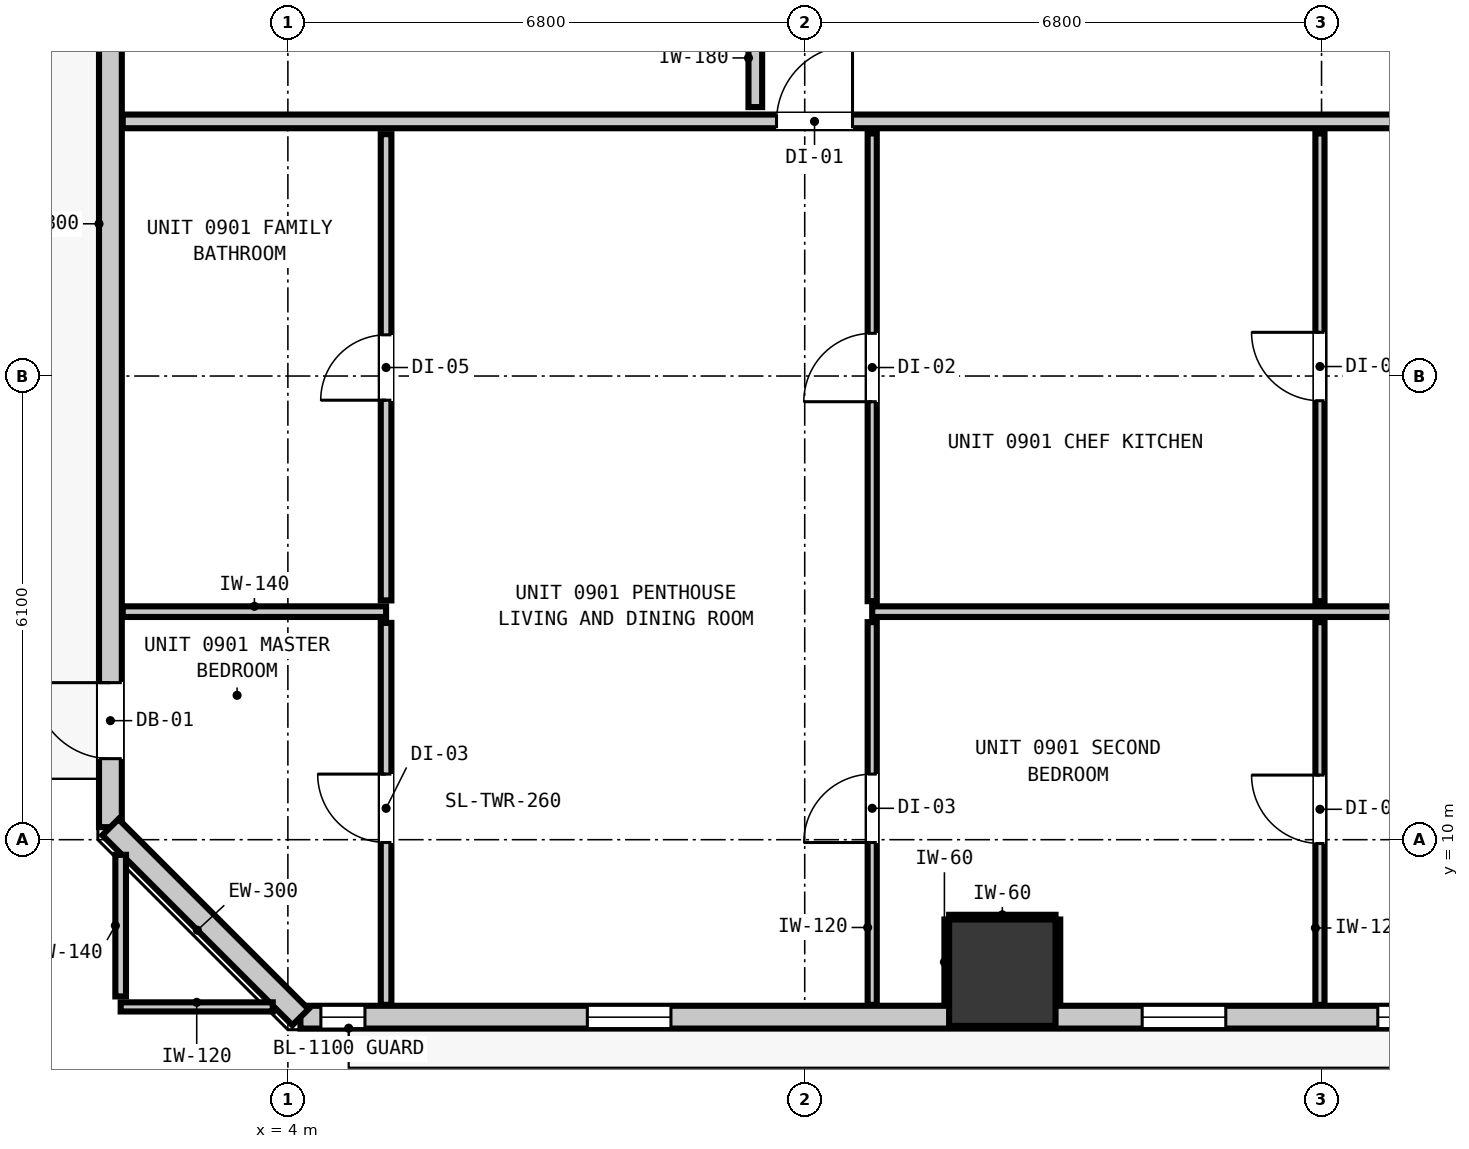
"""IFC4 building model, lengths in metres.
Left out: names, types, materials, properties, quantities, classifications, styles, units other than length and angle.
Written with IfcOpenShell. Run it as: python <this file> out.ifc"""

import sys

from ifc_helpers import new_model, si_unit, direction, frame, frame_2d, origin, origin_2d, place, context, subcontext, project, spatial, rectangle, extrude, element, fill, save


model = new_model("IFC4")
c1 = context("Model", 3, precision=1e-05, world=origin(), true_north=direction((0.0, 1.0)))
c2 = subcontext(c1, "Body", "Model", "MODEL_VIEW")
j1 = project(units=[si_unit("LENGTHUNIT", "METRE"), si_unit("PLANEANGLEUNIT", "RADIAN")], contexts=[c1])
p1 = place(None, origin())
s1 = spatial("IfcSite", under=j1, at=p1, CompositionType="ELEMENT")
p2 = place(p1, origin())
s2 = spatial("IfcBuilding", under=s1, at=p2, CompositionType="ELEMENT")
p3 = place(p2, frame((0.0, 0.0, 35.28)))
s3 = spatial("IfcBuildingStorey", under=s2, at=p3, CompositionType="ELEMENT", Elevation=35.28)
p4 = place(p3, frame((13.4, 8.25, 0.0), z_axis=(0.0, 0.0, 1.0), x_axis=(1.0, 0.0, 0.0)))
e1 = element("IfcColumn", 1, at=p4, inside=s3, PredefinedType="COLUMN", context=c2, shape_type="SweptSolid", body=[
    extrude(rectangle(XDim=1.4, YDim=1.4, at=origin_2d()), origin(), (0.0, 0.0, 1.0), 3.32),
])
p5 = place(p3, frame((1.665, 10.165, 0.0), z_axis=(0.0, 0.0, 1.0), x_axis=(0.0, 1.0, 0.0)))
e2 = element("IfcWall", 2, at=p5, inside=s3, PredefinedType="STANDARD", context=c2, shape_type="SweptSolid", body=[
    extrude(rectangle(XDim=34.67, YDim=0.3, at=frame_2d((17.335, 0.0))), origin(), (0.0, 0.0, 1.0), 3.06),
])
p6 = place(p5, frame((0.901, 0.0, 0.0)))
e3 = element("IfcOpeningElement", 3, at=p6, cuts=e2, PredefinedType="OPENING", context=c2, shape_type="SweptSolid", body=[
    extrude(rectangle(XDim=1.0, YDim=2.15, at=frame_2d((0.5, 1.075))), frame((0.0, 0.16, 0.0), z_axis=(0.0, -1.0, 0.0), x_axis=(1.0, 0.0, 0.0)), (0.0, 0.0, 1.0), 0.32),
])
p7 = place(p5, frame((17.825, 0.0, 0.85)))
e4 = element("IfcOpeningElement", 4, at=p7, cuts=e2, PredefinedType="OPENING", context=c2, shape_type="SweptSolid", body=[
    extrude(rectangle(XDim=1.1, YDim=2.05, at=frame_2d((0.55, 1.025))), frame((0.0, 0.16, 0.0), z_axis=(0.0, -1.0, 0.0), x_axis=(1.0, 0.0, 0.0)), (0.0, 0.0, 1.0), 0.32),
])
p8 = place(p5, frame((13.975, 0.0, 0.85)))
e5 = element("IfcOpeningElement", 5, at=p8, cuts=e2, PredefinedType="OPENING", context=c2, shape_type="SweptSolid", body=[
    extrude(rectangle(XDim=1.1, YDim=2.05, at=frame_2d((0.55, 1.025))), frame((0.0, 0.16, 0.0), z_axis=(0.0, -1.0, 0.0), x_axis=(1.0, 0.0, 0.0)), (0.0, 0.0, 1.0), 0.32),
])
p9 = place(p5, frame((25.995, 0.0, 0.85)))
e6 = element("IfcOpeningElement", 6, at=p9, cuts=e2, PredefinedType="OPENING", context=c2, shape_type="SweptSolid", body=[
    extrude(rectangle(XDim=1.1, YDim=2.05, at=frame_2d((0.55, 1.025))), frame((0.0, 0.16, 0.0), z_axis=(0.0, -1.0, 0.0), x_axis=(1.0, 0.0, 0.0)), (0.0, 0.0, 1.0), 0.32),
])
p10 = place(p3, frame((41.635, 7.665, 0.0), z_axis=(0.0, 0.0, 1.0), x_axis=(-1.0, 0.0, 0.0)))
e7 = element("IfcWall", 7, at=p10, inside=s3, PredefinedType="STANDARD", context=c2, shape_type="SweptSolid", body=[
    extrude(rectangle(XDim=37.47, YDim=0.3, at=frame_2d((18.735, 0.0))), origin(), (0.0, 0.0, 1.0), 3.06),
])
p11 = place(p10, frame((0.901, 0.0, 0.0)))
e8 = element("IfcOpeningElement", 8, at=p11, cuts=e7, PredefinedType="OPENING", context=c2, shape_type="SweptSolid", body=[
    extrude(rectangle(XDim=1.0, YDim=2.15, at=frame_2d((0.5, 1.075))), frame((0.0, 0.16, 0.0), z_axis=(0.0, -1.0, 0.0), x_axis=(1.0, 0.0, 0.0)), (0.0, 0.0, 1.0), 0.32),
])
p12 = place(p10, frame((32.595, 0.0, 0.85)))
e9 = element("IfcOpeningElement", 9, at=p12, cuts=e7, PredefinedType="OPENING", context=c2, shape_type="SweptSolid", body=[
    extrude(rectangle(XDim=1.1, YDim=2.05, at=frame_2d((0.55, 1.025))), frame((0.0, 0.16, 0.0), z_axis=(0.0, -1.0, 0.0), x_axis=(1.0, 0.0, 0.0)), (0.0, 0.0, 1.0), 0.32),
])
p13 = place(p10, frame((36.621, 0.0, 0.85)))
e10 = element("IfcOpeningElement", 10, at=p13, cuts=e7, PredefinedType="OPENING", context=c2, shape_type="SweptSolid", body=[
    extrude(rectangle(XDim=0.58, YDim=1.5, at=frame_2d((0.29, 0.75))), frame((0.0, 0.16, 0.0), z_axis=(0.0, -1.0, 0.0), x_axis=(1.0, 0.0, 0.0)), (0.0, 0.0, 1.0), 0.32),
])
p14 = place(p10, frame((25.295, 0.0, 0.85)))
e11 = element("IfcOpeningElement", 11, at=p14, cuts=e7, PredefinedType="OPENING", context=c2, shape_type="SweptSolid", body=[
    extrude(rectangle(XDim=1.1, YDim=2.05, at=frame_2d((0.55, 1.025))), frame((0.0, 0.16, 0.0), z_axis=(0.0, -1.0, 0.0), x_axis=(1.0, 0.0, 0.0)), (0.0, 0.0, 1.0), 0.32),
])
p15 = place(p10, frame((22.195, 0.0, 0.85)))
e12 = element("IfcOpeningElement", 12, at=p15, cuts=e7, PredefinedType="OPENING", context=c2, shape_type="SweptSolid", body=[
    extrude(rectangle(XDim=1.1, YDim=2.05, at=frame_2d((0.55, 1.025))), frame((0.0, 0.16, 0.0), z_axis=(0.0, -1.0, 0.0), x_axis=(1.0, 0.0, 0.0)), (0.0, 0.0, 1.0), 0.32),
])
p16 = place(p10, frame((8.235, 0.0, 0.85)))
e13 = element("IfcOpeningElement", 13, at=p16, cuts=e7, PredefinedType="OPENING", context=c2, shape_type="SweptSolid", body=[
    extrude(rectangle(XDim=1.1, YDim=2.05, at=frame_2d((0.55, 1.025))), frame((0.0, 0.16, 0.0), z_axis=(0.0, -1.0, 0.0), x_axis=(1.0, 0.0, 0.0)), (0.0, 0.0, 1.0), 0.32),
])
p17 = place(p10, frame((16.219, 0.0, 0.85)))
e14 = element("IfcOpeningElement", 14, at=p17, cuts=e7, PredefinedType="OPENING", context=c2, shape_type="SweptSolid", body=[
    extrude(rectangle(XDim=1.1, YDim=2.05, at=frame_2d((0.55, 1.025))), frame((0.0, 0.16, 0.0), z_axis=(0.0, -1.0, 0.0), x_axis=(1.0, 0.0, 0.0)), (0.0, 0.0, 1.0), 0.32),
])
p18 = place(p3, frame((4.165, 7.665, 0.0), z_axis=(0.0, 0.0, 1.0), x_axis=(-0.707106781187, 0.707106781187, 0.0)))
e15 = element("IfcWall", 15, at=p18, inside=s3, PredefinedType="STANDARD", context=c2, shape_type="SweptSolid", body=[
    extrude(rectangle(XDim=3.536, YDim=0.3, at=frame_2d((1.768, 0.0))), origin(), (0.0, 0.0, 1.0), 3.06),
])
p19 = place(p3, frame((1.827, 19.45, 0.0), z_axis=(0.0, 0.0, 1.0), x_axis=(1.0, 0.0, 0.0)))
e16 = element("IfcWall", 16, at=p19, inside=s3, PredefinedType="PARTITIONING", context=c2, shape_type="SweptSolid", body=[
    extrude(rectangle(XDim=42.146, YDim=0.18, at=frame_2d((21.073, 0.0))), origin(), (0.0, 0.0, 1.0), 3.06),
])
p20 = place(p19, frame((8.602, 0.0, 0.0)))
e17 = element("IfcOpeningElement", 17, at=p20, cuts=e16, PredefinedType="OPENING", context=c2, shape_type="SweptSolid", body=[
    extrude(rectangle(XDim=1.0, YDim=2.15, at=frame_2d((0.5, 1.075))), frame((0.0, 0.1, 0.0), z_axis=(0.0, -1.0, 0.0), x_axis=(1.0, 0.0, 0.0)), (0.0, 0.0, 1.0), 0.2),
])
p21 = place(p19, frame((30.475, 0.0, 0.0)))
e18 = element("IfcOpeningElement", 18, at=p21, cuts=e16, PredefinedType="OPENING", context=c2, shape_type="SweptSolid", body=[
    extrude(rectangle(XDim=1.0, YDim=2.15, at=frame_2d((0.5, 1.075))), frame((0.0, 0.1, 0.0), z_axis=(0.0, -1.0, 0.0), x_axis=(1.0, 0.0, 0.0)), (0.0, 0.0, 1.0), 0.2),
])
p22 = place(p3, frame((1.827, 13.0, 0.0), z_axis=(0.0, 0.0, 1.0), x_axis=(1.0, 0.0, 0.0)))
e19 = element("IfcWall", 19, at=p22, inside=s3, PredefinedType="PARTITIONING", context=c2, shape_type="SweptSolid", body=[
    extrude(rectangle(XDim=3.465, YDim=0.14, at=frame_2d((1.732, 0.0))), origin(), (0.0, 0.0, 1.0), 3.06),
])
p23 = place(p3, frame((11.688, 13.0, 0.0), z_axis=(0.0, 0.0, 1.0), x_axis=(1.0, 0.0, 0.0)))
e20 = element("IfcWall", 20, at=p23, inside=s3, PredefinedType="PARTITIONING", context=c2, shape_type="SweptSolid", body=[
    extrude(rectangle(XDim=32.285, YDim=0.14, at=frame_2d((16.143, 0.0))), origin(), (0.0, 0.0, 1.0), 3.06),
])
p24 = place(p23, frame((20.664, 0.0, 0.0)))
e21 = element("IfcOpeningElement", 21, at=p24, cuts=e20, PredefinedType="OPENING", context=c2, shape_type="SweptSolid", body=[
    extrude(rectangle(XDim=0.9, YDim=2.1, at=frame_2d((0.45, 1.05))), frame((0.0, 0.08, 0.0), z_axis=(0.0, -1.0, 0.0), x_axis=(1.0, 0.0, 0.0)), (0.0, 0.0, 1.0), 0.16),
])
p25 = place(p3, frame((1.8, 7.8, 0.0), z_axis=(0.0, 0.0, 1.0), x_axis=(1.0, 0.0, 0.0)))
e22 = element("IfcWall", 22, at=p25, inside=s3, PredefinedType="PARTITIONING", context=c2, shape_type="SweptSolid", body=[
    extrude(rectangle(XDim=2.001, YDim=0.12, at=frame_2d((1.0, 0.0))), origin(), (0.0, 0.0, 1.0), 3.06),
])
p26 = place(p3, frame((10.15, 19.638, 0.0), z_axis=(0.0, 0.0, 1.0), x_axis=(0.0, 1.0, 0.0)))
e23 = element("IfcWall", 23, at=p26, inside=s3, PredefinedType="PARTITIONING", context=c2, shape_type="SweptSolid", body=[
    extrude(rectangle(XDim=1.294, YDim=0.18, at=frame_2d((0.647, 0.0))), origin(), (0.0, 0.0, 1.0), 3.06),
])
p27 = place(p3, frame((1.8, 7.938, 0.0), z_axis=(0.0, 0.0, 1.0), x_axis=(0.0, 1.0, 0.0)))
e24 = element("IfcWall", 24, at=p27, inside=s3, PredefinedType="PARTITIONING", context=c2, shape_type="SweptSolid", body=[
    extrude(rectangle(XDim=1.863, YDim=0.14, at=frame_2d((0.932, 0.0))), origin(), (0.0, 0.0, 1.0), 3.06),
])
p28 = place(p3, frame((5.292, 7.827, 0.0), z_axis=(0.0, 0.0, 1.0), x_axis=(0.0, 1.0, 0.0)))
e25 = element("IfcWall", 25, at=p28, inside=s3, PredefinedType="PARTITIONING", context=c2, shape_type="SweptSolid", body=[
    extrude(rectangle(XDim=5.025, YDim=0.14, at=frame_2d((2.513, 0.0))), origin(), (0.0, 0.0, 1.0), 3.06),
])
p29 = place(p28, frame((2.136, 0.0, 0.0)))
e26 = element("IfcOpeningElement", 26, at=p29, cuts=e25, PredefinedType="OPENING", context=c2, shape_type="SweptSolid", body=[
    extrude(rectangle(XDim=0.9, YDim=2.1, at=frame_2d((0.45, 1.05))), frame((0.0, 0.08, 0.0), z_axis=(0.0, -1.0, 0.0), x_axis=(1.0, 0.0, 0.0)), (0.0, 0.0, 1.0), 0.16),
])
p30 = place(p3, frame((5.292, 13.148, 0.0), z_axis=(0.0, 0.0, 1.0), x_axis=(0.0, 1.0, 0.0)))
e27 = element("IfcWall", 27, at=p30, inside=s3, PredefinedType="PARTITIONING", context=c2, shape_type="SweptSolid", body=[
    extrude(rectangle(XDim=6.134, YDim=0.14, at=frame_2d((3.067, 0.0))), origin(), (0.0, 0.0, 1.0), 3.06),
])
p31 = place(p30, frame((2.634, 0.0, 0.0)))
e28 = element("IfcOpeningElement", 28, at=p31, cuts=e27, PredefinedType="OPENING", context=c2, shape_type="SweptSolid", body=[
    extrude(rectangle(XDim=0.86, YDim=2.02, at=frame_2d((0.43, 1.01))), frame((0.0, 0.08, 0.0), z_axis=(0.0, -1.0, 0.0), x_axis=(1.0, 0.0, 0.0)), (0.0, 0.0, 1.0), 0.16),
])
p32 = place(p3, frame((11.688, 7.827, 0.0), z_axis=(0.0, 0.0, 1.0), x_axis=(0.0, 1.0, 0.0)))
e29 = element("IfcWall", 29, at=p32, inside=s3, PredefinedType="PARTITIONING", context=c2, shape_type="SweptSolid", body=[
    extrude(rectangle(XDim=5.035, YDim=0.12, at=frame_2d((2.518, 0.0))), origin(), (0.0, 0.0, 1.0), 3.06),
])
p33 = place(p32, frame((2.136, 0.0, 0.0)))
e30 = element("IfcOpeningElement", 30, at=p33, cuts=e29, PredefinedType="OPENING", context=c2, shape_type="SweptSolid", body=[
    extrude(rectangle(XDim=0.9, YDim=2.1, at=frame_2d((0.45, 1.05))), frame((0.0, 0.07, 0.0), z_axis=(0.0, -1.0, 0.0), x_axis=(1.0, 0.0, 0.0)), (0.0, 0.0, 1.0), 0.14),
])
p34 = place(p3, frame((11.688, 13.138, 0.0), z_axis=(0.0, 0.0, 1.0), x_axis=(0.0, 1.0, 0.0)))
e31 = element("IfcWall", 31, at=p34, inside=s3, PredefinedType="PARTITIONING", context=c2, shape_type="SweptSolid", body=[
    extrude(rectangle(XDim=6.154, YDim=0.12, at=frame_2d((3.077, 0.0))), origin(), (0.0, 0.0, 1.0), 3.06),
])
p35 = place(p34, frame((2.624, 0.0, 0.0)))
e32 = element("IfcOpeningElement", 32, at=p35, cuts=e31, PredefinedType="OPENING", context=c2, shape_type="SweptSolid", body=[
    extrude(rectangle(XDim=0.9, YDim=2.1, at=frame_2d((0.45, 1.05))), frame((0.0, 0.07, 0.0), z_axis=(0.0, -1.0, 0.0), x_axis=(1.0, 0.0, 0.0)), (0.0, 0.0, 1.0), 0.14),
])
p36 = place(p3, frame((17.579, 7.827, 0.0), z_axis=(0.0, 0.0, 1.0), x_axis=(0.0, 1.0, 0.0)))
e33 = element("IfcWall", 33, at=p36, inside=s3, PredefinedType="PARTITIONING", context=c2, shape_type="SweptSolid", body=[
    extrude(rectangle(XDim=5.035, YDim=0.12, at=frame_2d((2.518, 0.0))), origin(), (0.0, 0.0, 1.0), 3.06),
])
p37 = place(p36, frame((2.123, 0.0, 0.0)))
e34 = element("IfcOpeningElement", 34, at=p37, cuts=e33, PredefinedType="OPENING", context=c2, shape_type="SweptSolid", body=[
    extrude(rectangle(XDim=0.9, YDim=2.1, at=frame_2d((0.45, 1.05))), frame((0.0, 0.07, 0.0), z_axis=(0.0, -1.0, 0.0), x_axis=(1.0, 0.0, 0.0)), (0.0, 0.0, 1.0), 0.14),
])
p38 = place(p3, frame((17.579, 13.138, 0.0), z_axis=(0.0, 0.0, 1.0), x_axis=(0.0, 1.0, 0.0)))
e35 = element("IfcWall", 35, at=p38, inside=s3, PredefinedType="PARTITIONING", context=c2, shape_type="SweptSolid", body=[
    extrude(rectangle(XDim=6.154, YDim=0.12, at=frame_2d((3.077, 0.0))), origin(), (0.0, 0.0, 1.0), 3.06),
])
p39 = place(p38, frame((2.637, 0.0, 0.0)))
e36 = element("IfcOpeningElement", 36, at=p39, cuts=e35, PredefinedType="OPENING", context=c2, shape_type="SweptSolid", body=[
    extrude(rectangle(XDim=0.9, YDim=2.1, at=frame_2d((0.45, 1.05))), frame((0.0, 0.07, 0.0), z_axis=(0.0, -1.0, 0.0), x_axis=(1.0, 0.0, 0.0)), (0.0, 0.0, 1.0), 0.14),
])
p40 = place(p3, frame((12.7, 8.982, 0.0), z_axis=(0.0, 0.0, 1.0), x_axis=(1.0, 0.0, 0.0)))
e37 = element("IfcWall", 37, at=p40, inside=s3, PredefinedType="PARTITIONING", context=c2, shape_type="SweptSolid", body=[
    extrude(rectangle(XDim=1.4, YDim=0.06, at=frame_2d((0.7, 0.0))), origin(), (0.0, 0.0, 1.0), 1.45),
])
for number, where, z_axis, x_axis in (
    (38, (12.668, 7.83, 0.0), (0.0, 0.0, 1.0), (0.0, 1.0, 0.0)),
    (39, (14.132, 7.83, 0.0), (0.0, 0.0, 1.0), (0.0, 1.0, 0.0)),
):
    element("IfcWall", number, at=place(p3, frame(where, z_axis=z_axis, x_axis=x_axis)), inside=s3, PredefinedType="PARTITIONING", context=c2, shape_type="SweptSolid", body=[
        extrude(rectangle(XDim=1.12, YDim=0.06, at=frame_2d((0.56, 0.0))), origin(), (0.0, 0.0, 1.0), 1.45),
    ])
p41 = place(p6, origin())
e40 = element("IfcDoor", 40, at=p41, inside=s3, OperationType="SINGLE_SWING_RIGHT", PredefinedType="DOOR", context=c2, shape_type="SweptSolid", body=[
    extrude(rectangle(XDim=1.0, YDim=2.15, at=frame_2d((0.5, 1.075))), frame((0.0, 0.025, 0.0), z_axis=(0.0, -1.0, 0.0), x_axis=(1.0, 0.0, 0.0)), (0.0, 0.0, 1.0), 0.05),
])
fill(e3, e40)
p42 = place(p12, origin())
e41 = element("IfcWindow", 41, at=p42, inside=s3, PartitioningType="SINGLE_PANEL", PredefinedType="WINDOW", context=c2, shape_type="SweptSolid", body=[
    extrude(rectangle(XDim=1.1, YDim=2.05, at=frame_2d((0.55, 1.025))), frame((0.0, 0.03, 0.0), z_axis=(0.0, -1.0, 0.0), x_axis=(1.0, 0.0, 0.0)), (0.0, 0.0, 1.0), 0.06),
])
fill(e9, e41)
p43 = place(p13, origin())
e42 = element("IfcWindow", 42, at=p43, inside=s3, PartitioningType="SINGLE_PANEL", PredefinedType="WINDOW", context=c2, shape_type="SweptSolid", body=[
    extrude(rectangle(XDim=0.58, YDim=1.5, at=frame_2d((0.29, 0.75))), frame((0.0, 0.03, 0.0), z_axis=(0.0, -1.0, 0.0), x_axis=(1.0, 0.0, 0.0)), (0.0, 0.0, 1.0), 0.06),
])
fill(e10, e42)
p44 = place(p14, origin())
e43 = element("IfcWindow", 43, at=p44, inside=s3, PartitioningType="SINGLE_PANEL", PredefinedType="WINDOW", context=c2, shape_type="SweptSolid", body=[
    extrude(rectangle(XDim=1.1, YDim=2.05, at=frame_2d((0.55, 1.025))), frame((0.0, 0.03, 0.0), z_axis=(0.0, -1.0, 0.0), x_axis=(1.0, 0.0, 0.0)), (0.0, 0.0, 1.0), 0.06),
])
fill(e11, e43)
p45 = place(p15, origin())
e44 = element("IfcWindow", 44, at=p45, inside=s3, PartitioningType="SINGLE_PANEL", PredefinedType="WINDOW", context=c2, shape_type="SweptSolid", body=[
    extrude(rectangle(XDim=1.1, YDim=2.05, at=frame_2d((0.55, 1.025))), frame((0.0, 0.03, 0.0), z_axis=(0.0, -1.0, 0.0), x_axis=(1.0, 0.0, 0.0)), (0.0, 0.0, 1.0), 0.06),
])
fill(e12, e44)
p46 = place(p20, origin())
e45 = element("IfcDoor", 45, at=p46, inside=s3, OperationType="SINGLE_SWING_RIGHT", PredefinedType="DOOR", context=c2, shape_type="SweptSolid", body=[
    extrude(rectangle(XDim=1.0, YDim=2.15, at=frame_2d((0.5, 1.075))), frame((0.0, 0.025, 0.0), z_axis=(0.0, -1.0, 0.0), x_axis=(1.0, 0.0, 0.0)), (0.0, 0.0, 1.0), 0.05),
])
fill(e17, e45)
p47 = place(p31, origin())
e46 = element("IfcDoor", 46, at=p47, inside=s3, OperationType="SINGLE_SWING_LEFT", PredefinedType="DOOR", context=c2, shape_type="SweptSolid", body=[
    extrude(rectangle(XDim=0.86, YDim=2.02, at=frame_2d((0.43, 1.01))), frame((0.0, 0.025, 0.0), z_axis=(0.0, -1.0, 0.0), x_axis=(1.0, 0.0, 0.0)), (0.0, 0.0, 1.0), 0.05),
])
fill(e28, e46)
p48 = place(p29, origin())
e47 = element("IfcDoor", 47, at=p48, inside=s3, OperationType="SINGLE_SWING_RIGHT", PredefinedType="DOOR", context=c2, shape_type="SweptSolid", body=[
    extrude(rectangle(XDim=0.9, YDim=2.1, at=frame_2d((0.45, 1.05))), frame((0.0, 0.025, 0.0), z_axis=(0.0, -1.0, 0.0), x_axis=(1.0, 0.0, 0.0)), (0.0, 0.0, 1.0), 0.05),
])
fill(e26, e47)
p49 = place(p35, origin())
e48 = element("IfcDoor", 48, at=p49, inside=s3, OperationType="SINGLE_SWING_LEFT", PredefinedType="DOOR", context=c2, shape_type="SweptSolid", body=[
    extrude(rectangle(XDim=0.9, YDim=2.1, at=frame_2d((0.45, 1.05))), frame((0.0, 0.025, 0.0), z_axis=(0.0, -1.0, 0.0), x_axis=(1.0, 0.0, 0.0)), (0.0, 0.0, 1.0), 0.05),
])
fill(e32, e48)
p50 = place(p39, origin())
e49 = element("IfcDoor", 49, at=p50, inside=s3, OperationType="SINGLE_SWING_RIGHT", PredefinedType="DOOR", context=c2, shape_type="SweptSolid", body=[
    extrude(rectangle(XDim=0.9, YDim=2.1, at=frame_2d((0.45, 1.05))), frame((0.0, 0.025, 0.0), z_axis=(0.0, -1.0, 0.0), x_axis=(1.0, 0.0, 0.0)), (0.0, 0.0, 1.0), 0.05),
])
fill(e36, e49)
p51 = place(p33, origin())
e50 = element("IfcDoor", 50, at=p51, inside=s3, OperationType="SINGLE_SWING_LEFT", PredefinedType="DOOR", context=c2, shape_type="SweptSolid", body=[
    extrude(rectangle(XDim=0.9, YDim=2.1, at=frame_2d((0.45, 1.05))), frame((0.0, 0.025, 0.0), z_axis=(0.0, -1.0, 0.0), x_axis=(1.0, 0.0, 0.0)), (0.0, 0.0, 1.0), 0.05),
])
fill(e30, e50)
p52 = place(p37, origin())
e51 = element("IfcDoor", 51, at=p52, inside=s3, OperationType="SINGLE_SWING_RIGHT", PredefinedType="DOOR", context=c2, shape_type="SweptSolid", body=[
    extrude(rectangle(XDim=0.9, YDim=2.1, at=frame_2d((0.45, 1.05))), frame((0.0, 0.025, 0.0), z_axis=(0.0, -1.0, 0.0), x_axis=(1.0, 0.0, 0.0)), (0.0, 0.0, 1.0), 0.05),
])
fill(e34, e51)
save(model, sys.argv[1])
